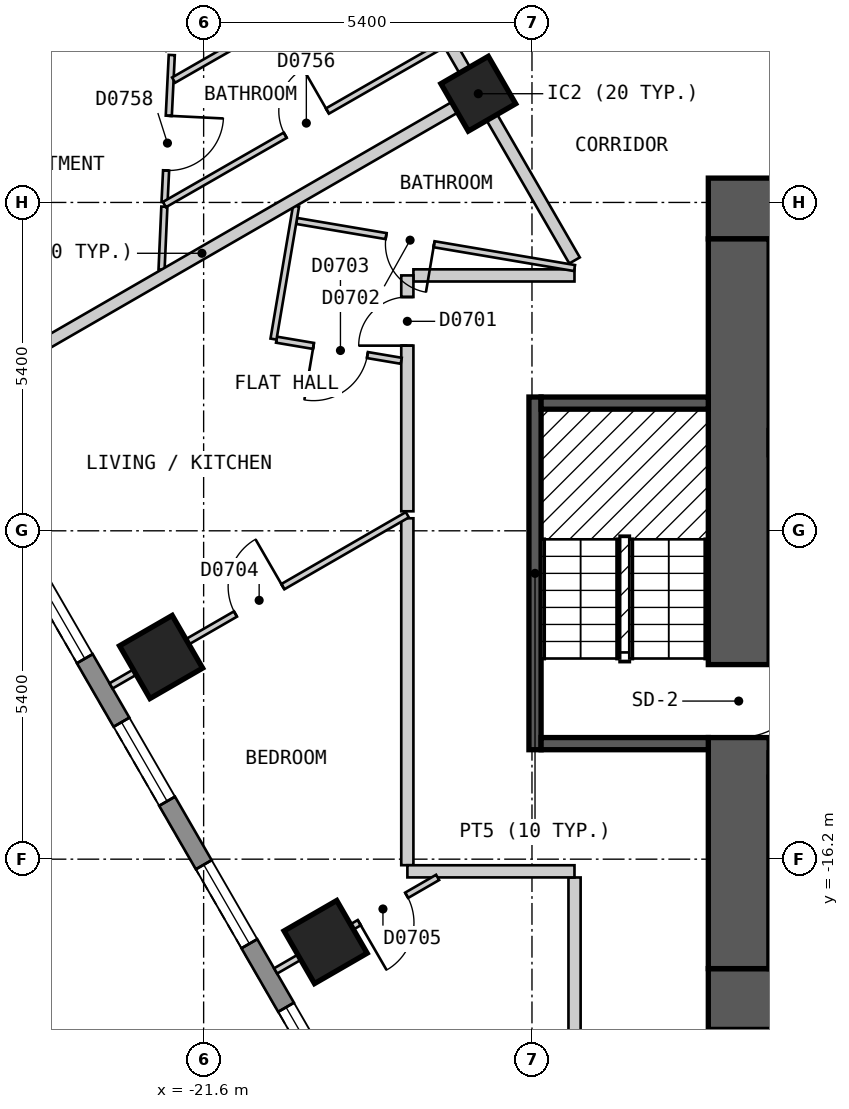
"""IFC4 building model, lengths in metres.
Left out: names, types, materials, properties, quantities, classifications, styles, units other than length and angle.
Written with IfcOpenShell. Run it as: python <this file> out.ifc"""

import sys

from ifc_helpers import new_model, si_unit, direction, frame, frame_2d, origin, origin_2d, place, context, subcontext, project, spatial, polyline, rectangle, outline, extrude, element, fill, save


model = new_model("IFC4")
c1 = context("Model", 3, precision=1e-05, world=origin(), true_north=direction((0.0, 1.0)))
c2 = subcontext(c1, "Body", "Model", "MODEL_VIEW")
j1 = project(units=[si_unit("LENGTHUNIT", "METRE"), si_unit("PLANEANGLEUNIT", "RADIAN")], contexts=[c1])
p1 = place(None, origin())
s1 = spatial("IfcSite", under=j1, at=p1, CompositionType="ELEMENT")
p2 = place(p1, origin())
s2 = spatial("IfcBuilding", under=s1, at=p2, CompositionType="ELEMENT")
p3 = place(p2, frame((0.0, 0.0, 105.0)))
s3 = spatial("IfcBuildingStorey", under=s2, at=p3, CompositionType="ELEMENT", Elevation=105.0)
for number, where, z_axis, x_axis in (
    (1, (-22.3, -12.875, 0.0), (0.0, 0.0, 1.0), (0.5, -0.866, 0.0)),
    (2, (-19.594, -17.563, 0.0), (0.0, 0.0, 1.0), (0.5, -0.866, 0.0)),
):
    element("IfcColumn", number, at=place(p3, frame(where, z_axis=z_axis, x_axis=x_axis)), inside=s3, PredefinedType="COLUMN", context=c2, shape_type="SweptSolid", body=[
        extrude(rectangle(XDim=1.0, YDim=1.0, at=origin_2d()), origin(), (0.0, 0.0, 1.0), 3.0),
    ])
p4 = place(p3, frame((-17.083, -3.612, 0.0), z_axis=(0.0, 0.0, 1.0), x_axis=(0.5, -0.866025403784, 0.0)))
e3 = element("IfcColumn", 3, at=p4, inside=s3, PredefinedType="COLUMN", context=c2, shape_type="SweptSolid", body=[
    extrude(rectangle(XDim=0.9, YDim=0.9, at=origin_2d()), origin(), (0.0, 0.0, 1.0), 3.0),
])
p5 = place(p3, frame((-13.3, -18.5, 0.0), z_axis=(0.0, 0.0, 1.0), x_axis=(1.0, 0.0, 0.0)))
e4 = element("IfcWall", 4, at=p5, inside=s3, PredefinedType="SHEAR", context=c2, shape_type="SweptSolid", body=[
    extrude(rectangle(XDim=26.6, YDim=1.0, at=frame_2d((13.3, 0.0))), origin(), (0.0, 0.0, 1.0), 2.6),
])
p6 = place(p3, frame((-13.3, -5.5, 0.0), z_axis=(0.0, 0.0, 1.0), x_axis=(1.0, 0.0, 0.0)))
e5 = element("IfcWall", 5, at=p6, inside=s3, PredefinedType="SHEAR", context=c2, shape_type="SweptSolid", body=[
    extrude(rectangle(XDim=26.6, YDim=1.0, at=frame_2d((13.3, 0.0))), origin(), (0.0, 0.0, 1.0), 2.6),
])
p7 = place(p6, frame((23.65, 0.0, 0.0)))
e6 = element("IfcOpeningElement", 6, at=p7, cuts=e5, PredefinedType="OPENING", context=c2, shape_type="SweptSolid", body=[
    extrude(rectangle(XDim=1.2, YDim=2.1, at=frame_2d((0.6, 1.05))), frame((0.0, 0.51, 0.0), z_axis=(0.0, -1.0, 0.0), x_axis=(1.0, 0.0, 0.0)), (0.0, 0.0, 1.0), 1.02),
])
p8 = place(p3, frame((-12.8, -18.0, 0.0), z_axis=(0.0, 0.0, 1.0), x_axis=(0.0, 1.0, 0.0)))
e7 = element("IfcWall", 7, at=p8, inside=s3, PredefinedType="SHEAR", context=c2, shape_type="SweptSolid", body=[
    extrude(rectangle(XDim=12.0, YDim=1.0, at=frame_2d((6.0, 0.0))), origin(), (0.0, 0.0, 1.0), 2.6),
])
p9 = place(p8, frame((3.8, 0.0, 0.0)))
e8 = element("IfcOpeningElement", 8, at=p9, cuts=e7, PredefinedType="OPENING", context=c2, shape_type="SweptSolid", body=[
    extrude(rectangle(XDim=1.2, YDim=2.1, at=frame_2d((0.6, 1.05))), frame((0.0, 0.51, 0.0), z_axis=(0.0, -1.0, 0.0), x_axis=(1.0, 0.0, 0.0)), (0.0, 0.0, 1.0), 1.02),
])
p10 = place(p3, frame((-29.027, -3.425, 0.0), z_axis=(0.0, 0.0, 1.0), x_axis=(0.500035407905, -0.866004960056, 0.0)))
e9 = element("IfcWall", 9, at=p10, inside=s3, PredefinedType="SOLIDWALL", context=c2, shape_type="SweptSolid", body=[
    extrude(outline(polyline([(0.0, -0.15), (23.094, -0.15), (23.014, 0.15), (0.08, 0.15), (0.0, -0.15)])), origin(), (0.0, 0.0, 1.0), 2.6),
])
p11 = place(p10, frame((1.324, 0.0, 0.15)))
e10 = element("IfcOpeningElement", 10, at=p11, cuts=e9, PredefinedType="OPENING", context=c2, shape_type="SweptSolid", body=[
    extrude(rectangle(XDim=1.5, YDim=2.1, at=frame_2d((0.75, 1.05))), frame((0.0, 0.16, 0.0), z_axis=(0.0, -1.0, 0.0), x_axis=(1.0, 0.0, 0.0)), (0.0, 0.0, 1.0), 0.32),
])
p12 = place(p10, frame((4.031, 0.0, 0.15)))
e11 = element("IfcOpeningElement", 11, at=p12, cuts=e9, PredefinedType="OPENING", context=c2, shape_type="SweptSolid", body=[
    extrude(rectangle(XDim=1.5, YDim=2.1, at=frame_2d((0.75, 1.05))), frame((0.0, 0.16, 0.0), z_axis=(0.0, -1.0, 0.0), x_axis=(1.0, 0.0, 0.0)), (0.0, 0.0, 1.0), 0.32),
])
p13 = place(p10, frame((6.737, 0.0, 0.15)))
e12 = element("IfcOpeningElement", 12, at=p13, cuts=e9, PredefinedType="OPENING", context=c2, shape_type="SweptSolid", body=[
    extrude(rectangle(XDim=1.5, YDim=2.1, at=frame_2d((0.75, 1.05))), frame((0.0, 0.16, 0.0), z_axis=(0.0, -1.0, 0.0), x_axis=(1.0, 0.0, 0.0)), (0.0, 0.0, 1.0), 0.32),
])
p14 = place(p10, frame((9.444, 0.0, 0.15)))
e13 = element("IfcOpeningElement", 13, at=p14, cuts=e9, PredefinedType="OPENING", context=c2, shape_type="SweptSolid", body=[
    extrude(rectangle(XDim=1.5, YDim=2.1, at=frame_2d((0.75, 1.05))), frame((0.0, 0.16, 0.0), z_axis=(0.0, -1.0, 0.0), x_axis=(1.0, 0.0, 0.0)), (0.0, 0.0, 1.0), 0.32),
])
p15 = place(p10, frame((12.151, 0.0, 0.15)))
e14 = element("IfcOpeningElement", 14, at=p15, cuts=e9, PredefinedType="OPENING", context=c2, shape_type="SweptSolid", body=[
    extrude(rectangle(XDim=1.5, YDim=2.1, at=frame_2d((0.75, 1.05))), frame((0.0, 0.16, 0.0), z_axis=(0.0, -1.0, 0.0), x_axis=(1.0, 0.0, 0.0)), (0.0, 0.0, 1.0), 0.32),
])
p16 = place(p10, frame((14.857, 0.0, 0.15)))
e15 = element("IfcOpeningElement", 15, at=p16, cuts=e9, PredefinedType="OPENING", context=c2, shape_type="SweptSolid", body=[
    extrude(rectangle(XDim=1.5, YDim=2.1, at=frame_2d((0.75, 1.05))), frame((0.0, 0.16, 0.0), z_axis=(0.0, -1.0, 0.0), x_axis=(1.0, 0.0, 0.0)), (0.0, 0.0, 1.0), 0.32),
])
p17 = place(p10, frame((17.564, 0.0, 0.15)))
e16 = element("IfcOpeningElement", 16, at=p17, cuts=e9, PredefinedType="OPENING", context=c2, shape_type="SweptSolid", body=[
    extrude(rectangle(XDim=1.5, YDim=2.1, at=frame_2d((0.75, 1.05))), frame((0.0, 0.16, 0.0), z_axis=(0.0, -1.0, 0.0), x_axis=(1.0, 0.0, 0.0)), (0.0, 0.0, 1.0), 0.32),
])
p18 = place(p10, frame((20.27, 0.0, 0.15)))
e17 = element("IfcOpeningElement", 17, at=p18, cuts=e9, PredefinedType="OPENING", context=c2, shape_type="SweptSolid", body=[
    extrude(rectangle(XDim=1.5, YDim=2.1, at=frame_2d((0.75, 1.05))), frame((0.0, 0.16, 0.0), z_axis=(0.0, -1.0, 0.0), x_axis=(1.0, 0.0, 0.0)), (0.0, 0.0, 1.0), 0.32),
])
p19 = place(p3, frame((-18.533, -1.101, 0.0), z_axis=(0.0, 0.0, 1.0), x_axis=(0.500135180047, -0.865947343479, 0.0)))
e18 = element("IfcWall", 18, at=p19, inside=s3, PredefinedType="PARTITIONING", context=c2, shape_type="SweptSolid", body=[
    extrude(rectangle(XDim=2.799, YDim=0.2, at=frame_2d((1.399, 0.0))), origin(), (0.0, 0.0, 1.0), 2.6),
])
p20 = place(p19, frame((0.562, 0.0, 0.0)))
e19 = element("IfcOpeningElement", 19, at=p20, cuts=e18, PredefinedType="OPENING", context=c2, shape_type="SweptSolid", body=[
    extrude(rectangle(XDim=1.0, YDim=2.1, at=frame_2d((0.5, 1.05))), frame((0.0, 0.11, 0.0), z_axis=(0.0, -1.0, 0.0), x_axis=(1.0, 0.0, 0.0)), (0.0, 0.0, 1.0), 0.22),
])
p21 = place(p3, frame((-16.855, -4.008, 0.0), z_axis=(0.0, 0.0, 1.0), x_axis=(0.500151474942, -0.865937932021, 0.0)))
e20 = element("IfcWall", 20, at=p21, inside=s3, PredefinedType="PARTITIONING", context=c2, shape_type="SweptSolid", body=[
    extrude(rectangle(XDim=2.709, YDim=0.2, at=frame_2d((1.354, 0.0))), origin(), (0.0, 0.0, 1.0), 2.6),
])
p22 = place(p3, frame((-15.5, -16.501, 0.0), z_axis=(0.0, 0.0, 1.0), x_axis=(0.0, -1.0, 0.0)))
e21 = element("IfcWall", 21, at=p22, inside=s3, PredefinedType="PARTITIONING", context=c2, shape_type="SweptSolid", body=[
    extrude(rectangle(XDim=4.598, YDim=0.2, at=frame_2d((2.299, 0.0))), origin(), (0.0, 0.0, 1.0), 2.6),
])
p23 = place(p3, frame((-18.25, -10.594, 0.0), z_axis=(0.0, 0.0, 1.0), x_axis=(0.0, -1.0, 0.0)))
e22 = element("IfcWall", 22, at=p23, inside=s3, PredefinedType="PARTITIONING", context=c2, shape_type="SweptSolid", body=[
    extrude(rectangle(XDim=5.705, YDim=0.2, at=frame_2d((2.853, 0.0))), origin(), (0.0, 0.0, 1.0), 2.6),
])
p24 = place(p3, frame((-18.15, -6.6, 0.0), z_axis=(0.0, 0.0, 1.0), x_axis=(1.0, 0.0, 0.0)))
e23 = element("IfcWall", 23, at=p24, inside=s3, PredefinedType="PARTITIONING", context=c2, shape_type="SweptSolid", body=[
    extrude(rectangle(XDim=2.649, YDim=0.2, at=frame_2d((1.324, 0.0))), origin(), (0.0, 0.0, 1.0), 2.6),
])
p25 = place(p3, frame((-18.249, -16.4, 0.0), z_axis=(0.0, 0.0, 1.0), x_axis=(1.0, 0.0, 0.0)))
e24 = element("IfcWall", 24, at=p25, inside=s3, PredefinedType="PARTITIONING", context=c2, shape_type="SweptSolid", body=[
    extrude(rectangle(XDim=2.748, YDim=0.2, at=frame_2d((1.374, 0.0))), origin(), (0.0, 0.0, 1.0), 2.6),
])
p26 = place(p3, frame((-18.25, -10.479, 0.0), z_axis=(0.0, 0.0, 1.0), x_axis=(0.0, 1.0, 0.0)))
e25 = element("IfcWall", 25, at=p26, inside=s3, PredefinedType="PARTITIONING", context=c2, shape_type="SweptSolid", body=[
    extrude(rectangle(XDim=3.879, YDim=0.2, at=frame_2d((1.939, 0.0))), origin(), (0.0, 0.0, 1.0), 2.6),
])
p27 = place(p26, frame((2.724, 0.0, 0.0)))
e26 = element("IfcOpeningElement", 26, at=p27, cuts=e25, PredefinedType="OPENING", context=c2, shape_type="SweptSolid", body=[
    extrude(rectangle(XDim=0.8, YDim=2.1, at=frame_2d((0.4, 1.05))), frame((0.0, 0.11, 0.0), z_axis=(0.0, -1.0, 0.0), x_axis=(1.0, 0.0, 0.0)), (0.0, 0.0, 1.0), 0.22),
])
p28 = place(p3, frame((-20.071, -5.704, 0.0), z_axis=(0.0, 0.0, 1.0), x_axis=(0.985933263306, -0.16713946364, 0.0)))
e27 = element("IfcWall", 27, at=p28, inside=s3, PredefinedType="PARTITIONING", context=c2, shape_type="SweptSolid", body=[
    extrude(rectangle(XDim=4.636, YDim=0.1, at=frame_2d((2.318, 0.0))), origin(), (0.0, 0.0, 1.0), 2.6),
])
p29 = place(p28, frame((1.493, 0.0, 0.0)))
e28 = element("IfcOpeningElement", 28, at=p29, cuts=e27, PredefinedType="OPENING", context=c2, shape_type="SweptSolid", body=[
    extrude(rectangle(XDim=0.8, YDim=2.1, at=frame_2d((0.4, 1.05))), frame((0.0, 0.06, 0.0), z_axis=(0.0, -1.0, 0.0), x_axis=(1.0, 0.0, 0.0)), (0.0, 0.0, 1.0), 0.12),
])
p30 = place(p3, frame((-20.401, -7.657, 0.0), z_axis=(0.0, 0.0, 1.0), x_axis=(0.985991281902, -0.166796858522, 0.0)))
e29 = element("IfcWall", 29, at=p30, inside=s3, PredefinedType="PARTITIONING", context=c2, shape_type="SweptSolid", body=[
    extrude(rectangle(XDim=2.08, YDim=0.1, at=frame_2d((1.04, 0.0))), origin(), (0.0, 0.0, 1.0), 2.6),
])
p31 = place(p30, frame((0.616, 0.0, 0.0)))
e30 = element("IfcOpeningElement", 30, at=p31, cuts=e29, PredefinedType="OPENING", context=c2, shape_type="SweptSolid", body=[
    extrude(rectangle(XDim=0.9, YDim=2.1, at=frame_2d((0.45, 1.05))), frame((0.0, 0.06, 0.0), z_axis=(0.0, -1.0, 0.0), x_axis=(1.0, 0.0, 0.0)), (0.0, 0.0, 1.0), 0.12),
])
p32 = place(p3, frame((-20.451, -7.647, 0.0), z_axis=(0.0, 0.0, 1.0), x_axis=(0.167037570483, 0.985950531237, 0.0)))
e31 = element("IfcWall", 31, at=p32, inside=s3, PredefinedType="PARTITIONING", context=c2, shape_type="SweptSolid", body=[
    extrude(rectangle(XDim=2.22, YDim=0.1, at=frame_2d((1.11, 0.0))), origin(), (0.0, 0.0, 1.0), 2.6),
])
p33 = place(p3, frame((-22.243, -5.395, 0.0), z_axis=(0.0, 0.0, 1.0), x_axis=(0.049092933256, 0.998794214993, 0.0)))
e32 = element("IfcWall", 32, at=p33, inside=s3, PredefinedType="PARTITIONING", context=c2, shape_type="SweptSolid", body=[
    extrude(rectangle(XDim=2.422, YDim=0.1, at=frame_2d((1.211, 0.0))), origin(), (0.0, 0.0, 1.0), 2.6),
])
p34 = place(p33, frame((0.522, 0.0, 0.0)))
e33 = element("IfcOpeningElement", 33, at=p34, cuts=e32, PredefinedType="OPENING", context=c2, shape_type="SweptSolid", body=[
    extrude(rectangle(XDim=0.9, YDim=2.1, at=frame_2d((0.45, 1.05))), frame((0.0, 0.06, 0.0), z_axis=(0.0, -1.0, 0.0), x_axis=(1.0, 0.0, 0.0)), (0.0, 0.0, 1.0), 0.12),
])
p35 = place(p3, frame((-22.292, -6.504, 0.0), z_axis=(0.0, 0.0, 1.0), x_axis=(0.04434829575, 0.999016130332, 0.0)))
e34 = element("IfcWall", 34, at=p35, inside=s3, PredefinedType="PARTITIONING", context=c2, shape_type="SweptSolid", body=[
    extrude(rectangle(XDim=1.035, YDim=0.1, at=frame_2d((0.518, 0.0))), origin(), (0.0, 0.0, 1.0), 2.6),
])
p36 = place(p3, frame((-20.416, -18.038, 0.0), z_axis=(0.0, 0.0, 1.0), x_axis=(0.866026989333, 0.499997253739, 0.0)))
e35 = element("IfcWall", 35, at=p36, inside=s3, PredefinedType="PARTITIONING", context=c2, shape_type="SweptSolid", body=[
    extrude(rectangle(XDim=3.076, YDim=0.1, at=frame_2d((1.538, 0.0))), origin(), (0.0, 0.0, 1.0), 2.6),
])
p37 = place(p36, frame((1.588, 0.0, 0.0)))
e36 = element("IfcOpeningElement", 36, at=p37, cuts=e35, PredefinedType="OPENING", context=c2, shape_type="SweptSolid", body=[
    extrude(rectangle(XDim=0.9, YDim=2.1, at=frame_2d((0.45, 1.05))), frame((0.0, 0.06, 0.0), z_axis=(0.0, -1.0, 0.0), x_axis=(1.0, 0.0, 0.0)), (0.0, 0.0, 1.0), 0.12),
])
p38 = place(p3, frame((-23.123, -13.35, 0.0), z_axis=(0.0, 0.0, 1.0), x_axis=(0.86596737403, 0.500100497016, 0.0)))
e37 = element("IfcWall", 37, at=p38, inside=s3, PredefinedType="PARTITIONING", context=c2, shape_type="SweptSolid", body=[
    extrude(rectangle(XDim=5.627, YDim=0.1, at=frame_2d((2.813, 0.0))), origin(), (0.0, 0.0, 1.0), 2.6),
])
p39 = place(p38, frame((2.363, 0.0, 0.0)))
e38 = element("IfcOpeningElement", 38, at=p39, cuts=e37, PredefinedType="OPENING", context=c2, shape_type="SweptSolid", body=[
    extrude(rectangle(XDim=0.9, YDim=2.1, at=frame_2d((0.45, 1.05))), frame((0.0, 0.06, 0.0), z_axis=(0.0, -1.0, 0.0), x_axis=(1.0, 0.0, 0.0)), (0.0, 0.0, 1.0), 0.12),
])
p40 = place(p3, frame((-22.245, -5.435, 0.0), z_axis=(0.0, 0.0, 1.0), x_axis=(0.867311485465, 0.497765795511, 0.0)))
e39 = element("IfcWall", 39, at=p40, inside=s3, PredefinedType="PARTITIONING", context=c2, shape_type="SweptSolid", body=[
    extrude(rectangle(XDim=5.282, YDim=0.1, at=frame_2d((2.641, 0.0))), origin(), (0.0, 0.0, 1.0), 2.6),
])
p41 = place(p40, frame((2.291, 0.0, 0.0)))
e40 = element("IfcOpeningElement", 40, at=p41, cuts=e39, PredefinedType="OPENING", context=c2, shape_type="SweptSolid", body=[
    extrude(rectangle(XDim=0.8, YDim=2.1, at=frame_2d((0.4, 1.05))), frame((0.0, 0.06, 0.0), z_axis=(0.0, -1.0, 0.0), x_axis=(1.0, 0.0, 0.0)), (0.0, 0.0, 1.0), 0.12),
])
p42 = place(p3, frame((-22.094, -3.388, 0.0), z_axis=(0.0, 0.0, 1.0), x_axis=(0.867386440944, 0.497635169644, 0.0)))
e41 = element("IfcWall", 41, at=p42, inside=s3, PredefinedType="PARTITIONING", context=c2, shape_type="SweptSolid", body=[
    extrude(rectangle(XDim=4.127, YDim=0.1, at=frame_2d((2.064, 0.0))), origin(), (0.0, 0.0, 1.0), 2.6),
])
p43 = place(p42, frame((1.634, 0.0, 0.0)))
e42 = element("IfcOpeningElement", 42, at=p43, cuts=e41, PredefinedType="OPENING", context=c2, shape_type="SweptSolid", body=[
    extrude(rectangle(XDim=0.9, YDim=2.1, at=frame_2d((0.45, 1.05))), frame((0.0, 0.06, 0.0), z_axis=(0.0, -1.0, 0.0), x_axis=(1.0, 0.0, 0.0)), (0.0, 0.0, 1.0), 0.12),
])
p44 = place(p3, frame((-17.224, -3.844, 0.0), z_axis=(0.0, 0.0, 1.0), x_axis=(0.986049492372, -0.166452391373, 0.0)))
e43 = element("IfcWall", 43, at=p44, inside=s3, PredefinedType="PARTITIONING", context=c2, shape_type="SweptSolid", body=[
    extrude(rectangle(XDim=0.27, YDim=0.2, at=frame_2d((0.135, 0.0))), origin(), (0.0, 0.0, 1.0), 2.6),
])
p45 = place(p3, frame((-25.83, -8.662, 0.0), z_axis=(0.0, 0.0, 1.0), x_axis=(0.866026801646, 0.499997578825, 0.0)))
e44 = element("IfcWall", 44, at=p45, inside=s3, PredefinedType="PARTITIONING", context=c2, shape_type="SweptSolid", body=[
    extrude(rectangle(XDim=9.704, YDim=0.2, at=frame_2d((4.852, 0.0))), origin(), (0.0, 0.0, 1.0), 2.6),
])
p46 = place(p3, frame((-17.385, -3.786, 0.0), z_axis=(0.0, 0.0, 1.0), x_axis=(0.86668269741, 0.498859801958, 0.0)))
e45 = element("IfcWall", 45, at=p46, inside=s3, PredefinedType="PARTITIONING", context=c2, shape_type="SweptSolid", body=[
    extrude(rectangle(XDim=0.319, YDim=0.2, at=frame_2d((0.159, 0.0))), origin(), (0.0, 0.0, 1.0), 2.6),
])
p47 = place(p3, frame((-16.15, -14.4, 0.0), z_axis=(0.0, 0.0, 1.0), x_axis=(0.0, 1.0, 0.0)))
e46 = element("IfcWall", 46, at=p47, inside=s3, PredefinedType="SOLIDWALL", context=c2, shape_type="SweptSolid", body=[
    extrude(rectangle(XDim=5.8, YDim=0.2, at=frame_2d((2.9, 0.0))), origin(), (0.0, 0.0, 1.0), 2.6),
])
for number, where, z_axis, x_axis in (
    (47, (-16.05, -14.3, 0.0), (0.0, 0.0, 1.0), (1.0, 0.0, 0.0)),
    (48, (-16.05, -8.7, 0.0), (0.0, 0.0, 1.0), (1.0, 0.0, 0.0)),
):
    element("IfcWall", number, at=place(p3, frame(where, z_axis=z_axis, x_axis=x_axis)), inside=s3, PredefinedType="SOLIDWALL", context=c2, shape_type="SweptSolid", body=[
        extrude(rectangle(XDim=2.75, YDim=0.2, at=frame_2d((1.375, 0.0))), origin(), (0.0, 0.0, 1.0), 2.6),
    ])
p48 = place(p14, origin())
e49 = element("IfcWindow", 49, at=p48, inside=s3, PartitioningType="SINGLE_PANEL", PredefinedType="WINDOW", context=c2, shape_type="SweptSolid", body=[
    extrude(rectangle(XDim=1.5, YDim=2.1, at=frame_2d((0.75, 1.05))), frame((0.0, 0.03, 0.0), z_axis=(0.0, -1.0, 0.0), x_axis=(1.0, 0.0, 0.0)), (0.0, 0.0, 1.0), 0.06),
])
fill(e13, e49)
p49 = place(p15, origin())
e50 = element("IfcWindow", 50, at=p49, inside=s3, PartitioningType="SINGLE_PANEL", PredefinedType="WINDOW", context=c2, shape_type="SweptSolid", body=[
    extrude(rectangle(XDim=1.5, YDim=2.1, at=frame_2d((0.75, 1.05))), frame((0.0, 0.03, 0.0), z_axis=(0.0, -1.0, 0.0), x_axis=(1.0, 0.0, 0.0)), (0.0, 0.0, 1.0), 0.06),
])
fill(e14, e50)
p50 = place(p16, origin())
e51 = element("IfcWindow", 51, at=p50, inside=s3, PartitioningType="SINGLE_PANEL", PredefinedType="WINDOW", context=c2, shape_type="SweptSolid", body=[
    extrude(rectangle(XDim=1.5, YDim=2.1, at=frame_2d((0.75, 1.05))), frame((0.0, 0.03, 0.0), z_axis=(0.0, -1.0, 0.0), x_axis=(1.0, 0.0, 0.0)), (0.0, 0.0, 1.0), 0.06),
])
fill(e15, e51)
p51 = place(p17, origin())
e52 = element("IfcWindow", 52, at=p51, inside=s3, PartitioningType="SINGLE_PANEL", PredefinedType="WINDOW", context=c2, shape_type="SweptSolid", body=[
    extrude(rectangle(XDim=1.5, YDim=2.1, at=frame_2d((0.75, 1.05))), frame((0.0, 0.03, 0.0), z_axis=(0.0, -1.0, 0.0), x_axis=(1.0, 0.0, 0.0)), (0.0, 0.0, 1.0), 0.06),
])
fill(e16, e52)
p52 = place(p27, origin())
e53 = element("IfcDoor", 53, at=p52, inside=s3, OperationType="SINGLE_SWING_LEFT", PredefinedType="DOOR", context=c2, shape_type="SweptSolid", body=[
    extrude(rectangle(XDim=0.8, YDim=2.1, at=frame_2d((0.4, 1.05))), frame((0.0, 0.025, 0.0), z_axis=(0.0, -1.0, 0.0), x_axis=(1.0, 0.0, 0.0)), (0.0, 0.0, 1.0), 0.05),
])
fill(e26, e53)
p53 = place(p29, origin())
e54 = element("IfcDoor", 54, at=p53, inside=s3, OperationType="SINGLE_SWING_RIGHT", PredefinedType="DOOR", context=c2, shape_type="SweptSolid", body=[
    extrude(rectangle(XDim=0.8, YDim=2.1, at=frame_2d((0.4, 1.05))), frame((0.0, 0.025, 0.0), z_axis=(0.0, -1.0, 0.0), x_axis=(1.0, 0.0, 0.0)), (0.0, 0.0, 1.0), 0.05),
])
fill(e28, e54)
p54 = place(p31, origin())
e55 = element("IfcDoor", 55, at=p54, inside=s3, OperationType="SINGLE_SWING_LEFT", PredefinedType="DOOR", context=c2, shape_type="SweptSolid", body=[
    extrude(rectangle(XDim=0.9, YDim=2.1, at=frame_2d((0.45, 1.05))), frame((0.0, 0.025, 0.0), z_axis=(0.0, -1.0, 0.0), x_axis=(1.0, 0.0, 0.0)), (0.0, 0.0, 1.0), 0.05),
])
fill(e30, e55)
p55 = place(p39, origin())
e56 = element("IfcDoor", 56, at=p55, inside=s3, OperationType="SINGLE_SWING_RIGHT", PredefinedType="DOOR", context=c2, shape_type="SweptSolid", body=[
    extrude(rectangle(XDim=0.9, YDim=2.1, at=frame_2d((0.45, 1.05))), frame((0.0, 0.025, 0.0), z_axis=(0.0, -1.0, 0.0), x_axis=(1.0, 0.0, 0.0)), (0.0, 0.0, 1.0), 0.05),
])
fill(e38, e56)
p56 = place(p37, origin())
e57 = element("IfcDoor", 57, at=p56, inside=s3, OperationType="SINGLE_SWING_LEFT", PredefinedType="DOOR", context=c2, shape_type="SweptSolid", body=[
    extrude(rectangle(XDim=0.9, YDim=2.1, at=frame_2d((0.45, 1.05))), frame((0.0, 0.025, 0.0), z_axis=(0.0, -1.0, 0.0), x_axis=(1.0, 0.0, 0.0)), (0.0, 0.0, 1.0), 0.05),
])
fill(e36, e57)
p57 = place(p41, origin())
e58 = element("IfcDoor", 58, at=p57, inside=s3, OperationType="SINGLE_SWING_RIGHT", PredefinedType="DOOR", context=c2, shape_type="SweptSolid", body=[
    extrude(rectangle(XDim=0.8, YDim=2.1, at=frame_2d((0.4, 1.05))), frame((0.0, 0.025, 0.0), z_axis=(0.0, -1.0, 0.0), x_axis=(1.0, 0.0, 0.0)), (0.0, 0.0, 1.0), 0.05),
])
fill(e40, e58)
p58 = place(p34, origin())
e59 = element("IfcDoor", 59, at=p58, inside=s3, OperationType="SINGLE_SWING_RIGHT", PredefinedType="DOOR", context=c2, shape_type="SweptSolid", body=[
    extrude(rectangle(XDim=0.9, YDim=2.1, at=frame_2d((0.45, 1.05))), frame((0.0, 0.025, 0.0), z_axis=(0.0, -1.0, 0.0), x_axis=(1.0, 0.0, 0.0)), (0.0, 0.0, 1.0), 0.05),
])
fill(e33, e59)
p59 = place(p9, origin())
e60 = element("IfcDoor", 60, at=p59, inside=s3, OperationType="SINGLE_SWING_RIGHT", PredefinedType="DOOR", context=c2, shape_type="SweptSolid", body=[
    extrude(rectangle(XDim=1.2, YDim=2.1, at=frame_2d((0.6, 1.05))), frame((0.0, 0.025, 0.0), z_axis=(0.0, -1.0, 0.0), x_axis=(1.0, 0.0, 0.0)), (0.0, 0.0, 1.0), 0.05),
])
fill(e8, e60)
save(model, sys.argv[1])
